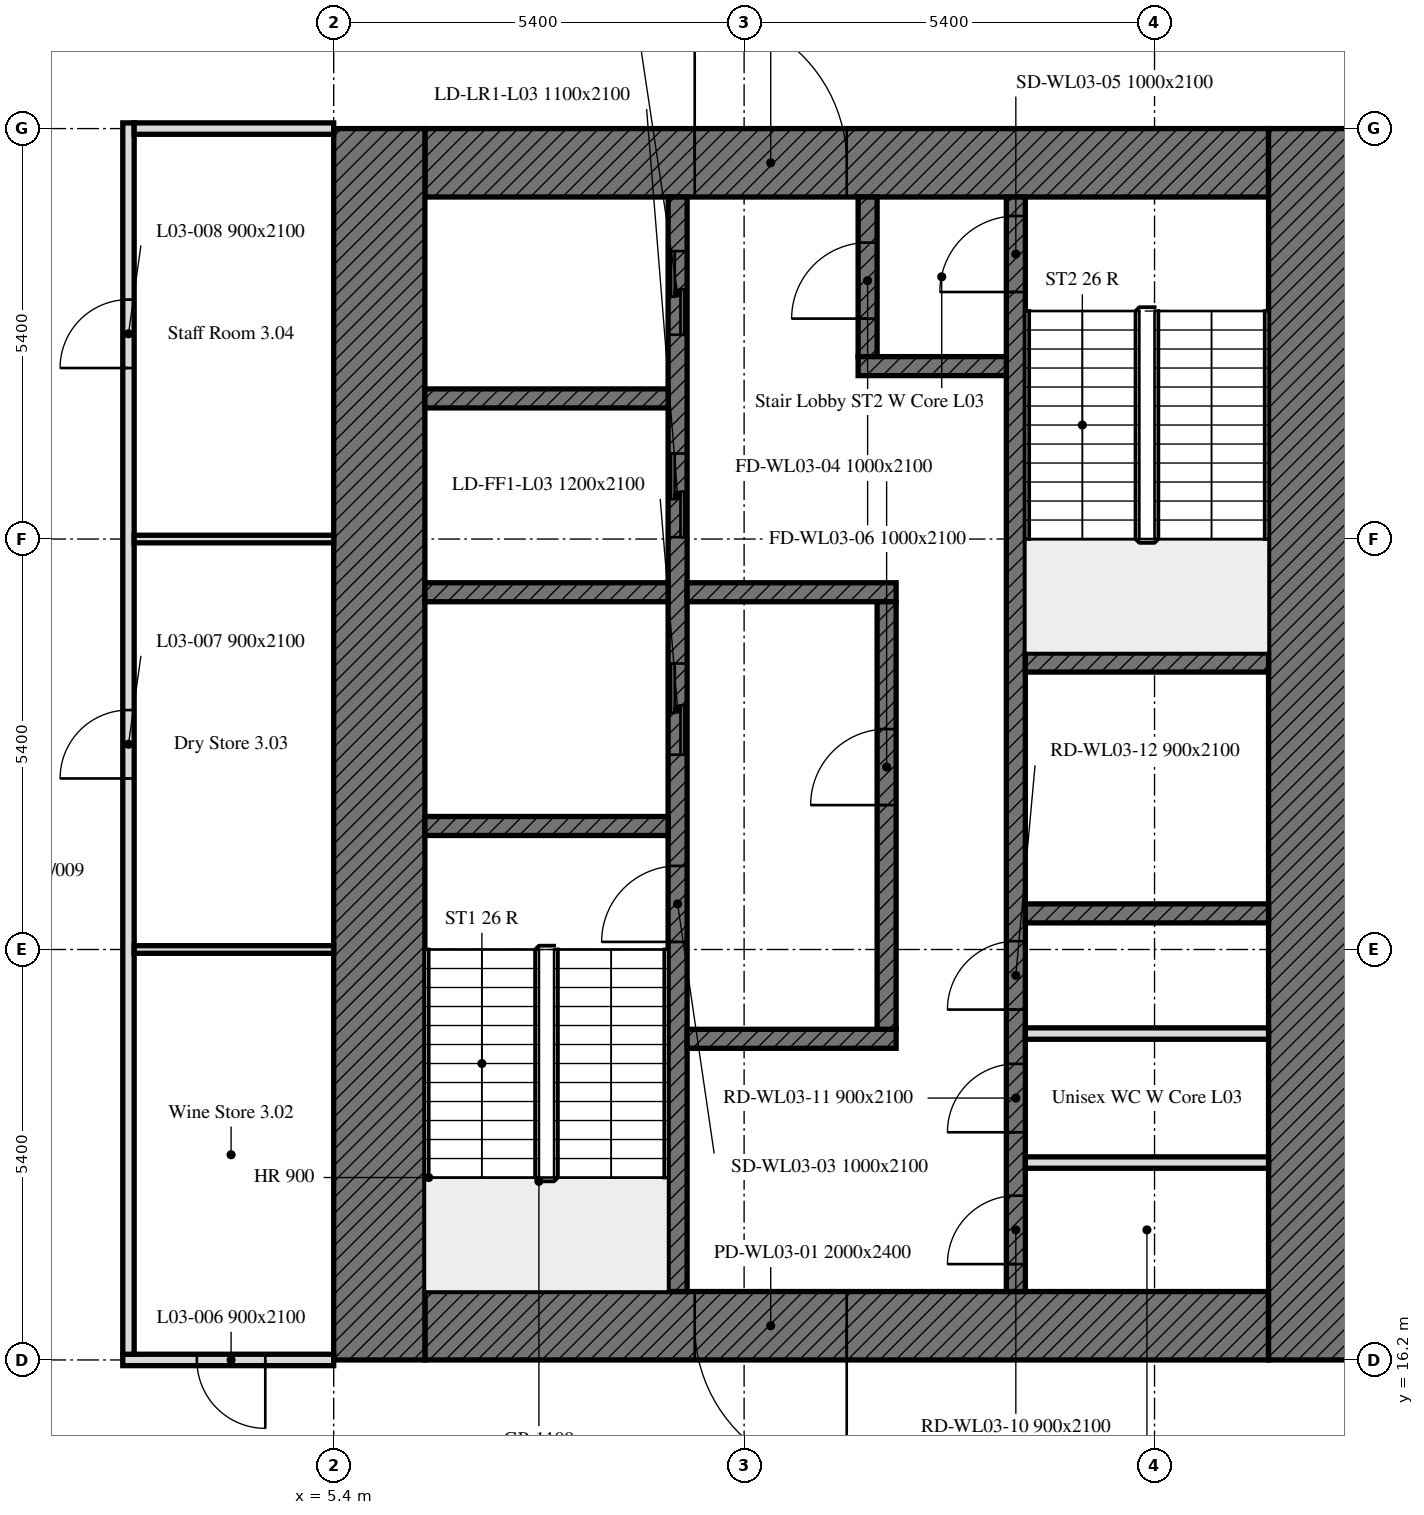
"""IFC4 building model, lengths in metres.
Left out: names, types, materials, properties, quantities, classifications, styles, units other than length and angle.
Written with IfcOpenShell. Run it as: python <this file> out.ifc"""

import sys

from ifc_helpers import new_model, si_unit, direction, frame, frame_2d, origin, place, context, subcontext, project, spatial, rectangle, extrude, element, fill, save


model = new_model("IFC4")
c1 = context("Model", 3, precision=1e-05, world=origin(), true_north=direction((0.0, 1.0)))
c2 = subcontext(c1, "Body", "Model", "MODEL_VIEW")
j1 = project(units=[si_unit("LENGTHUNIT", "METRE"), si_unit("PLANEANGLEUNIT", "RADIAN")], contexts=[c1])
p1 = place(None, origin())
s1 = spatial("IfcSite", under=j1, at=p1, CompositionType="ELEMENT")
p2 = place(p1, origin())
s2 = spatial("IfcBuilding", under=s1, at=p2, CompositionType="ELEMENT")
p3 = place(p2, frame((0.0, 0.0, 19.8)))
s3 = spatial("IfcBuildingStorey", under=s2, at=p3, CompositionType="ELEMENT", Elevation=19.8)
p4 = place(p3, frame((17.7, 16.65, 0.0), z_axis=(0.0, 0.0, 1.0), x_axis=(-1.0, 0.0, 0.0)))
e1 = element("IfcWall", 1, at=p4, inside=s3, PredefinedType="SOLIDWALL", context=c2, shape_type="SweptSolid", body=[
    extrude(rectangle(XDim=11.1, YDim=0.9, at=frame_2d((5.55, 0.0))), origin(), (0.0, 0.0, 1.0), 4.4),
])
p5 = place(p4, frame((5.55, 0.0, 0.0)))
e2 = element("IfcOpeningElement", 2, at=p5, cuts=e1, PredefinedType="OPENING", context=c2, shape_type="SweptSolid", body=[
    extrude(rectangle(XDim=2.0, YDim=2.4, at=frame_2d((1.0, 1.2))), frame((0.0, 0.45, 0.0), z_axis=(0.0, -1.0, 0.0), x_axis=(1.0, 0.0, 0.0)), (0.0, 0.0, 1.0), 0.9),
])
p6 = place(p3, frame((6.6, 31.95, 0.0), z_axis=(0.0, 0.0, 1.0), x_axis=(1.0, 0.0, 0.0)))
e3 = element("IfcWall", 3, at=p6, inside=s3, PredefinedType="SOLIDWALL", context=c2, shape_type="SweptSolid", body=[
    extrude(rectangle(XDim=11.1, YDim=0.9, at=frame_2d((5.55, 0.0))), origin(), (0.0, 0.0, 1.0), 4.4),
])
p7 = place(p6, frame((3.55, 0.0, 0.0)))
e4 = element("IfcOpeningElement", 4, at=p7, cuts=e3, PredefinedType="OPENING", context=c2, shape_type="SweptSolid", body=[
    extrude(rectangle(XDim=2.0, YDim=2.4, at=frame_2d((1.0, 1.2))), frame((0.0, 0.45, 0.0), z_axis=(0.0, -1.0, 0.0), x_axis=(1.0, 0.0, 0.0)), (0.0, 0.0, 1.0), 0.9),
])
for number, where, z_axis, x_axis in (
    (5, (6.0, 16.2, 0.0), (0.0, 0.0, 1.0), (0.0, 1.0, 0.0)),
    (6, (18.3, 32.4, 0.0), (0.0, 0.0, 1.0), (0.0, -1.0, 0.0)),
):
    element("IfcWall", number, at=place(p3, frame(where, z_axis=z_axis, x_axis=x_axis)), inside=s3, PredefinedType="SOLIDWALL", context=c2, shape_type="SweptSolid", body=[
        extrude(rectangle(XDim=16.2, YDim=1.2, at=frame_2d((8.1, 0.0))), origin(), (0.0, 0.0, 1.0), 4.4),
    ])
p8 = place(p3, frame((9.925, 17.1, 0.0), z_axis=(0.0, 0.0, 1.0), x_axis=(0.0, 1.0, 0.0)))
e7 = element("IfcWall", 7, at=p8, inside=s3, PredefinedType="SOLIDWALL", context=c2, shape_type="SweptSolid", body=[
    extrude(rectangle(XDim=14.4, YDim=0.25, at=frame_2d((7.2, 0.0))), origin(), (0.0, 0.0, 1.0), 4.4),
])
p9 = place(p8, frame((4.6, 0.0, 0.0)))
e8 = element("IfcOpeningElement", 8, at=p9, cuts=e7, PredefinedType="OPENING", context=c2, shape_type="SweptSolid", body=[
    extrude(rectangle(XDim=1.0, YDim=2.1, at=frame_2d((0.5, 1.05))), frame((0.0, 0.125, 0.0), z_axis=(0.0, -1.0, 0.0), x_axis=(1.0, 0.0, 0.0)), (0.0, 0.0, 1.0), 0.25),
])
p10 = place(p8, frame((7.062, 0.0, 0.0)))
e9 = element("IfcOpeningElement", 9, at=p10, cuts=e7, PredefinedType="OPENING", context=c2, shape_type="SweptSolid", body=[
    extrude(rectangle(XDim=1.2, YDim=2.1, at=frame_2d((0.6, 1.05))), frame((0.0, 0.125, 0.0), z_axis=(0.0, -1.0, 0.0), x_axis=(1.0, 0.0, 0.0)), (0.0, 0.0, 1.0), 0.25),
])
p11 = place(p8, frame((9.925, 0.0, 0.0)))
e10 = element("IfcOpeningElement", 10, at=p11, cuts=e7, PredefinedType="OPENING", context=c2, shape_type="SweptSolid", body=[
    extrude(rectangle(XDim=1.1, YDim=2.1, at=frame_2d((0.55, 1.05))), frame((0.0, 0.125, 0.0), z_axis=(0.0, -1.0, 0.0), x_axis=(1.0, 0.0, 0.0)), (0.0, 0.0, 1.0), 0.25),
])
p12 = place(p8, frame((12.587, 0.0, 0.0)))
e11 = element("IfcOpeningElement", 11, at=p12, cuts=e7, PredefinedType="OPENING", context=c2, shape_type="SweptSolid", body=[
    extrude(rectangle(XDim=1.1, YDim=2.1, at=frame_2d((0.55, 1.05))), frame((0.0, 0.125, 0.0), z_axis=(0.0, -1.0, 0.0), x_axis=(1.0, 0.0, 0.0)), (0.0, 0.0, 1.0), 0.25),
])
p13 = place(p3, frame((14.375, 17.1, 0.0), z_axis=(0.0, 0.0, 1.0), x_axis=(0.0, 1.0, 0.0)))
e12 = element("IfcWall", 12, at=p13, inside=s3, PredefinedType="SOLIDWALL", context=c2, shape_type="SweptSolid", body=[
    extrude(rectangle(XDim=14.4, YDim=0.25, at=frame_2d((7.2, 0.0))), origin(), (0.0, 0.0, 1.0), 4.4),
])
p14 = place(p13, frame((13.15, 0.0, 0.0)))
e13 = element("IfcOpeningElement", 13, at=p14, cuts=e12, PredefinedType="OPENING", context=c2, shape_type="SweptSolid", body=[
    extrude(rectangle(XDim=1.0, YDim=2.1, at=frame_2d((0.5, 1.05))), frame((0.0, 0.125, 0.0), z_axis=(0.0, -1.0, 0.0), x_axis=(1.0, 0.0, 0.0)), (0.0, 0.0, 1.0), 0.25),
])
p15 = place(p13, frame((0.361, 0.0, 0.0)))
e14 = element("IfcOpeningElement", 14, at=p15, cuts=e12, PredefinedType="OPENING", context=c2, shape_type="SweptSolid", body=[
    extrude(rectangle(XDim=0.9, YDim=2.1, at=frame_2d((0.45, 1.05))), frame((0.0, 0.125, 0.0), z_axis=(0.0, -1.0, 0.0), x_axis=(1.0, 0.0, 0.0)), (0.0, 0.0, 1.0), 0.25),
])
p16 = place(p13, frame((2.095, 0.0, 0.0)))
e15 = element("IfcOpeningElement", 15, at=p16, cuts=e12, PredefinedType="OPENING", context=c2, shape_type="SweptSolid", body=[
    extrude(rectangle(XDim=0.9, YDim=2.1, at=frame_2d((0.45, 1.05))), frame((0.0, 0.125, 0.0), z_axis=(0.0, -1.0, 0.0), x_axis=(1.0, 0.0, 0.0)), (0.0, 0.0, 1.0), 0.25),
])
p17 = place(p13, frame((3.709, 0.0, 0.0)))
e16 = element("IfcOpeningElement", 16, at=p17, cuts=e12, PredefinedType="OPENING", context=c2, shape_type="SweptSolid", body=[
    extrude(rectangle(XDim=0.9, YDim=2.1, at=frame_2d((0.45, 1.05))), frame((0.0, 0.125, 0.0), z_axis=(0.0, -1.0, 0.0), x_axis=(1.0, 0.0, 0.0)), (0.0, 0.0, 1.0), 0.25),
])
for number, where, z_axis, x_axis in (
    (17, (6.6, 23.225, 0.0), (0.0, 0.0, 1.0), (1.0, 0.0, 0.0)),
    (18, (14.5, 25.375, 0.0), (0.0, 0.0, 1.0), (1.0, 0.0, 0.0)),
    (19, (14.5, 22.075, 0.0), (0.0, 0.0, 1.0), (1.0, 0.0, 0.0)),
    (20, (6.6, 26.3, 0.0), (0.0, 0.0, 1.0), (1.0, 0.0, 0.0)),
):
    element("IfcWall", number, at=place(p3, frame(where, z_axis=z_axis, x_axis=x_axis)), inside=s3, PredefinedType="SOLIDWALL", context=c2, shape_type="SweptSolid", body=[
        extrude(rectangle(XDim=3.2, YDim=0.25, at=frame_2d((1.6, 0.0))), origin(), (0.0, 0.0, 1.0), 4.4),
    ])
for number, where, z_axis, x_axis in (
    (21, (10.05, 26.3, 0.0), (0.0, 0.0, 1.0), (1.0, 0.0, 0.0)),
    (22, (10.05, 20.425, 0.0), (0.0, 0.0, 1.0), (1.0, 0.0, 0.0)),
):
    element("IfcWall", number, at=place(p3, frame(where, z_axis=z_axis, x_axis=x_axis)), inside=s3, PredefinedType="SOLIDWALL", context=c2, shape_type="SweptSolid", body=[
        extrude(rectangle(XDim=2.75, YDim=0.25, at=frame_2d((1.375, 0.0))), origin(), (0.0, 0.0, 1.0), 4.4),
    ])
p18 = place(p3, frame((12.425, 29.4, 0.0), z_axis=(0.0, 0.0, 1.0), x_axis=(0.0, 1.0, 0.0)))
e23 = element("IfcWall", 23, at=p18, inside=s3, PredefinedType="SOLIDWALL", context=c2, shape_type="SweptSolid", body=[
    extrude(rectangle(XDim=2.1, YDim=0.25, at=frame_2d((1.05, 0.0))), origin(), (0.0, 0.0, 1.0), 4.4),
])
p19 = place(p18, frame((0.5, 0.0, 0.0)))
e24 = element("IfcOpeningElement", 24, at=p19, cuts=e23, PredefinedType="OPENING", context=c2, shape_type="SweptSolid", body=[
    extrude(rectangle(XDim=1.0, YDim=2.1, at=frame_2d((0.5, 1.05))), frame((0.0, 0.125, 0.0), z_axis=(0.0, -1.0, 0.0), x_axis=(1.0, 0.0, 0.0)), (0.0, 0.0, 1.0), 0.25),
])
p20 = place(p3, frame((12.3, 29.275, 0.0), z_axis=(0.0, 0.0, 1.0), x_axis=(1.0, 0.0, 0.0)))
e25 = element("IfcWall", 25, at=p20, inside=s3, PredefinedType="SOLIDWALL", context=c2, shape_type="SweptSolid", body=[
    extrude(rectangle(XDim=1.95, YDim=0.25, at=frame_2d((0.975, 0.0))), origin(), (0.0, 0.0, 1.0), 4.4),
])
p21 = place(p3, frame((12.675, 20.55, 0.0), z_axis=(0.0, 0.0, 1.0), x_axis=(0.0, 1.0, 0.0)))
e26 = element("IfcWall", 26, at=p21, inside=s3, PredefinedType="SOLIDWALL", context=c2, shape_type="SweptSolid", body=[
    extrude(rectangle(XDim=5.625, YDim=0.25, at=frame_2d((2.812, 0.0))), origin(), (0.0, 0.0, 1.0), 4.4),
])
p22 = place(p21, frame((2.95, 0.0, 0.0)))
e27 = element("IfcOpeningElement", 27, at=p22, cuts=e26, PredefinedType="OPENING", context=c2, shape_type="SweptSolid", body=[
    extrude(rectangle(XDim=1.0, YDim=2.1, at=frame_2d((0.5, 1.05))), frame((0.0, 0.125, 0.0), z_axis=(0.0, -1.0, 0.0), x_axis=(1.0, 0.0, 0.0)), (0.0, 0.0, 1.0), 0.25),
])
p23 = place(p3, frame((6.6, 28.85, 0.0), z_axis=(0.0, 0.0, 1.0), x_axis=(1.0, 0.0, 0.0)))
e28 = element("IfcWall", 28, at=p23, inside=s3, PredefinedType="SOLIDWALL", context=c2, shape_type="SweptSolid", body=[
    extrude(rectangle(XDim=3.2, YDim=0.25, at=frame_2d((1.6, 0.0))), origin(), (0.0, 0.0, 1.0), 4.4),
])
for number, where, z_axis, x_axis in (
    (29, (14.5, 18.797, 0.0), (0.0, 0.0, 1.0), (1.0, 0.0, 0.0)),
    (30, (14.5, 20.494, 0.0), (0.0, 0.0, 1.0), (1.0, 0.0, 0.0)),
):
    element("IfcWall", number, at=place(p3, frame(where, z_axis=z_axis, x_axis=x_axis)), inside=s3, PredefinedType="PARTITIONING", context=c2, shape_type="SweptSolid", body=[
        extrude(rectangle(XDim=3.2, YDim=0.15, at=frame_2d((1.6, 0.0))), origin(), (0.0, 0.0, 1.0), 4.4),
    ])
p24 = place(p3, frame((5.4, 16.2, 0.0), z_axis=(0.0, 0.0, 1.0), x_axis=(-1.0, 0.0, 0.0)))
e31 = element("IfcWall", 31, at=p24, inside=s3, PredefinedType="PARTITIONING", context=c2, shape_type="SweptSolid", body=[
    extrude(rectangle(XDim=2.775, YDim=0.15, at=frame_2d((1.387, 0.0))), origin(), (0.0, 0.0, 1.0), 3.65),
])
p25 = place(p24, frame((0.9, 0.0, 0.0)))
e32 = element("IfcOpeningElement", 32, at=p25, cuts=e31, PredefinedType="OPENING", context=c2, shape_type="SweptSolid", body=[
    extrude(rectangle(XDim=0.9, YDim=2.1, at=frame_2d((0.45, 1.05))), frame((0.0, 0.075, 0.0), z_axis=(0.0, -1.0, 0.0), x_axis=(1.0, 0.0, 0.0)), (0.0, 0.0, 1.0), 0.15),
])
p26 = place(p3, frame((2.7, 16.275, 0.0), z_axis=(0.0, 0.0, 1.0), x_axis=(0.0, 1.0, 0.0)))
e33 = element("IfcWall", 33, at=p26, inside=s3, PredefinedType="PARTITIONING", context=c2, shape_type="SweptSolid", body=[
    extrude(rectangle(XDim=16.2, YDim=0.15, at=frame_2d((8.1, 0.0))), origin(), (0.0, 0.0, 1.0), 3.65),
])
p27 = place(p26, frame((7.575, 0.0, 0.0)))
e34 = element("IfcOpeningElement", 34, at=p27, cuts=e33, PredefinedType="OPENING", context=c2, shape_type="SweptSolid", body=[
    extrude(rectangle(XDim=0.9, YDim=2.1, at=frame_2d((0.45, 1.05))), frame((0.0, 0.075, 0.0), z_axis=(0.0, -1.0, 0.0), x_axis=(1.0, 0.0, 0.0)), (0.0, 0.0, 1.0), 0.15),
])
p28 = place(p26, frame((12.975, 0.0, 0.0)))
e35 = element("IfcOpeningElement", 35, at=p28, cuts=e33, PredefinedType="OPENING", context=c2, shape_type="SweptSolid", body=[
    extrude(rectangle(XDim=0.9, YDim=2.1, at=frame_2d((0.45, 1.05))), frame((0.0, 0.075, 0.0), z_axis=(0.0, -1.0, 0.0), x_axis=(1.0, 0.0, 0.0)), (0.0, 0.0, 1.0), 0.15),
])
p29 = place(p3, frame((2.775, 32.4, 0.0), z_axis=(0.0, 0.0, 1.0), x_axis=(1.0, 0.0, 0.0)))
e36 = element("IfcWall", 36, at=p29, inside=s3, PredefinedType="PARTITIONING", context=c2, shape_type="SweptSolid", body=[
    extrude(rectangle(XDim=2.625, YDim=0.15, at=frame_2d((1.312, 0.0))), origin(), (0.0, 0.0, 1.0), 3.65),
])
for number, where, z_axis, x_axis in (
    (37, (5.4, 21.6, 0.0), (0.0, 0.0, 1.0), (-1.0, 0.0, 0.0)),
    (38, (5.4, 27.0, 0.0), (0.0, 0.0, 1.0), (-1.0, 0.0, 0.0)),
):
    element("IfcWall", number, at=place(p3, frame(where, z_axis=z_axis, x_axis=x_axis)), inside=s3, PredefinedType="PARTITIONING", context=c2, shape_type="SweptSolid", body=[
        extrude(rectangle(XDim=2.625, YDim=0.1, at=frame_2d((1.312, 0.0))), origin(), (0.0, 0.0, 1.0), 3.65),
    ])
p30 = place(p5, origin())
e39 = element("IfcDoor", 39, at=p30, inside=s3, OperationType="DOUBLE_DOOR_SINGLE_SWING", PredefinedType="DOOR", context=c2, shape_type="SweptSolid", body=[
    extrude(rectangle(XDim=2.0, YDim=2.4, at=frame_2d((1.0, 1.2))), frame((0.0, 0.025, 0.0), z_axis=(0.0, -1.0, 0.0), x_axis=(1.0, 0.0, 0.0)), (0.0, 0.0, 1.0), 0.05),
])
fill(e2, e39)
p31 = place(p7, origin())
e40 = element("IfcDoor", 40, at=p31, inside=s3, OperationType="DOUBLE_DOOR_SINGLE_SWING", PredefinedType="DOOR", context=c2, shape_type="SweptSolid", body=[
    extrude(rectangle(XDim=2.0, YDim=2.4, at=frame_2d((1.0, 1.2))), frame((0.0, 0.025, 0.0), z_axis=(0.0, -1.0, 0.0), x_axis=(1.0, 0.0, 0.0)), (0.0, 0.0, 1.0), 0.05),
])
fill(e4, e40)
p32 = place(p9, origin())
e41 = element("IfcDoor", 41, at=p32, inside=s3, OperationType="SINGLE_SWING_LEFT", PredefinedType="DOOR", context=c2, shape_type="SweptSolid", body=[
    extrude(rectangle(XDim=1.0, YDim=2.1, at=frame_2d((0.5, 1.05))), frame((0.0, 0.025, 0.0), z_axis=(0.0, -1.0, 0.0), x_axis=(1.0, 0.0, 0.0)), (0.0, 0.0, 1.0), 0.05),
])
fill(e8, e41)
p33 = place(p22, origin())
e42 = element("IfcDoor", 42, at=p33, inside=s3, OperationType="SINGLE_SWING_LEFT", PredefinedType="DOOR", context=c2, shape_type="SweptSolid", body=[
    extrude(rectangle(XDim=1.0, YDim=2.1, at=frame_2d((0.5, 1.05))), frame((0.0, 0.025, 0.0), z_axis=(0.0, -1.0, 0.0), x_axis=(1.0, 0.0, 0.0)), (0.0, 0.0, 1.0), 0.05),
])
fill(e27, e42)
p34 = place(p14, origin())
e43 = element("IfcDoor", 43, at=p34, inside=s3, OperationType="SINGLE_SWING_LEFT", PredefinedType="DOOR", context=c2, shape_type="SweptSolid", body=[
    extrude(rectangle(XDim=1.0, YDim=2.1, at=frame_2d((0.5, 1.05))), frame((0.0, 0.025, 0.0), z_axis=(0.0, -1.0, 0.0), x_axis=(1.0, 0.0, 0.0)), (0.0, 0.0, 1.0), 0.05),
])
fill(e13, e43)
p35 = place(p19, origin())
e44 = element("IfcDoor", 44, at=p35, inside=s3, OperationType="SINGLE_SWING_LEFT", PredefinedType="DOOR", context=c2, shape_type="SweptSolid", body=[
    extrude(rectangle(XDim=1.0, YDim=2.1, at=frame_2d((0.5, 1.05))), frame((0.0, 0.025, 0.0), z_axis=(0.0, -1.0, 0.0), x_axis=(1.0, 0.0, 0.0)), (0.0, 0.0, 1.0), 0.05),
])
fill(e24, e44)
p36 = place(p10, origin())
e45 = element("IfcDoor", 45, at=p36, inside=s3, OperationType="DOUBLE_DOOR_SLIDING", PredefinedType="DOOR", context=c2, shape_type="SweptSolid", body=[
    extrude(rectangle(XDim=1.2, YDim=2.1, at=frame_2d((0.6, 1.05))), frame((0.0, 0.025, 0.0), z_axis=(0.0, -1.0, 0.0), x_axis=(1.0, 0.0, 0.0)), (0.0, 0.0, 1.0), 0.05),
])
fill(e9, e45)
p37 = place(p11, origin())
e46 = element("IfcDoor", 46, at=p37, inside=s3, OperationType="DOUBLE_DOOR_SLIDING", PredefinedType="DOOR", context=c2, shape_type="SweptSolid", body=[
    extrude(rectangle(XDim=1.1, YDim=2.1, at=frame_2d((0.55, 1.05))), frame((0.0, 0.025, 0.0), z_axis=(0.0, -1.0, 0.0), x_axis=(1.0, 0.0, 0.0)), (0.0, 0.0, 1.0), 0.05),
])
fill(e10, e46)
p38 = place(p12, origin())
e47 = element("IfcDoor", 47, at=p38, inside=s3, OperationType="DOUBLE_DOOR_SLIDING", PredefinedType="DOOR", context=c2, shape_type="SweptSolid", body=[
    extrude(rectangle(XDim=1.1, YDim=2.1, at=frame_2d((0.55, 1.05))), frame((0.0, 0.025, 0.0), z_axis=(0.0, -1.0, 0.0), x_axis=(1.0, 0.0, 0.0)), (0.0, 0.0, 1.0), 0.05),
])
fill(e11, e47)
p39 = place(p15, origin())
e48 = element("IfcDoor", 48, at=p39, inside=s3, OperationType="SINGLE_SWING_LEFT", PredefinedType="DOOR", context=c2, shape_type="SweptSolid", body=[
    extrude(rectangle(XDim=0.9, YDim=2.1, at=frame_2d((0.45, 1.05))), frame((0.0, 0.025, 0.0), z_axis=(0.0, -1.0, 0.0), x_axis=(1.0, 0.0, 0.0)), (0.0, 0.0, 1.0), 0.05),
])
fill(e14, e48)
p40 = place(p16, origin())
e49 = element("IfcDoor", 49, at=p40, inside=s3, OperationType="SINGLE_SWING_LEFT", PredefinedType="DOOR", context=c2, shape_type="SweptSolid", body=[
    extrude(rectangle(XDim=0.9, YDim=2.1, at=frame_2d((0.45, 1.05))), frame((0.0, 0.025, 0.0), z_axis=(0.0, -1.0, 0.0), x_axis=(1.0, 0.0, 0.0)), (0.0, 0.0, 1.0), 0.05),
])
fill(e15, e49)
p41 = place(p17, origin())
e50 = element("IfcDoor", 50, at=p41, inside=s3, OperationType="SINGLE_SWING_LEFT", PredefinedType="DOOR", context=c2, shape_type="SweptSolid", body=[
    extrude(rectangle(XDim=0.9, YDim=2.1, at=frame_2d((0.45, 1.05))), frame((0.0, 0.025, 0.0), z_axis=(0.0, -1.0, 0.0), x_axis=(1.0, 0.0, 0.0)), (0.0, 0.0, 1.0), 0.05),
])
fill(e16, e50)
p42 = place(p25, origin())
e51 = element("IfcDoor", 51, at=p42, inside=s3, OperationType="SINGLE_SWING_RIGHT", PredefinedType="DOOR", context=c2, shape_type="SweptSolid", body=[
    extrude(rectangle(XDim=0.9, YDim=2.1, at=frame_2d((0.45, 1.05))), frame((0.0, 0.025, 0.0), z_axis=(0.0, -1.0, 0.0), x_axis=(1.0, 0.0, 0.0)), (0.0, 0.0, 1.0), 0.05),
])
fill(e32, e51)
p43 = place(p27, origin())
e52 = element("IfcDoor", 52, at=p43, inside=s3, OperationType="SINGLE_SWING_RIGHT", PredefinedType="DOOR", context=c2, shape_type="SweptSolid", body=[
    extrude(rectangle(XDim=0.9, YDim=2.1, at=frame_2d((0.45, 1.05))), frame((0.0, 0.025, 0.0), z_axis=(0.0, -1.0, 0.0), x_axis=(1.0, 0.0, 0.0)), (0.0, 0.0, 1.0), 0.05),
])
fill(e34, e52)
p44 = place(p28, origin())
e53 = element("IfcDoor", 53, at=p44, inside=s3, OperationType="SINGLE_SWING_RIGHT", PredefinedType="DOOR", context=c2, shape_type="SweptSolid", body=[
    extrude(rectangle(XDim=0.9, YDim=2.1, at=frame_2d((0.45, 1.05))), frame((0.0, 0.025, 0.0), z_axis=(0.0, -1.0, 0.0), x_axis=(1.0, 0.0, 0.0)), (0.0, 0.0, 1.0), 0.05),
])
fill(e35, e53)
save(model, sys.argv[1])
